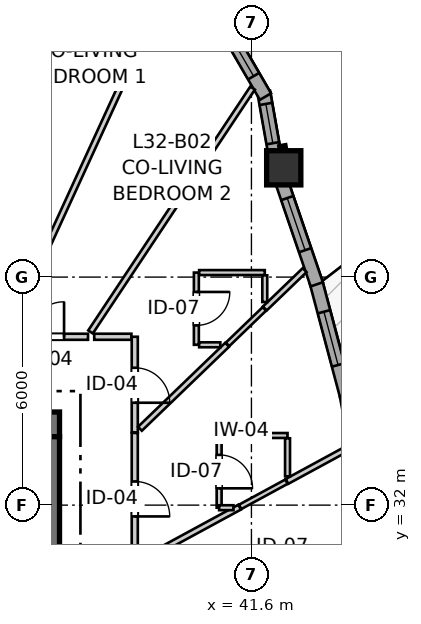
"""IFC4 building model, lengths in metres.
Left out: names, types, materials, properties, quantities, classifications, styles, units other than length and angle.
Written with IfcOpenShell. Run it as: python <this file> out.ifc"""

import sys

from ifc_helpers import new_model, si_unit, direction, frame, frame_2d, origin, origin_2d, place, context, subcontext, project, spatial, rectangle, extrude, source, transform, mapped, element, fill, save


model = new_model("IFC4")
c1 = context("Model", 3, precision=1e-05, world=origin(), true_north=direction((0.0, 1.0)))
c2 = subcontext(c1, "Body", "Model", "MODEL_VIEW")
j1 = project(units=[si_unit("LENGTHUNIT", "METRE"), si_unit("PLANEANGLEUNIT", "RADIAN")], contexts=[c1])
p1 = place(None, origin())
s1 = spatial("IfcSite", under=j1, at=p1, CompositionType="ELEMENT")
p2 = place(p1, origin())
s2 = spatial("IfcBuilding", under=s1, at=p2, CompositionType="ELEMENT")
p3 = place(p2, frame((0.0, 0.0, 108.8)))
s3 = spatial("IfcBuildingStorey", under=s2, at=p3, CompositionType="ELEMENT", Elevation=108.8)
p4 = place(p3, frame((36.55, 34.125, 0.0), z_axis=(0.0, 0.0, 1.0), x_axis=(-1.0, 0.0, 0.0)))
e1 = element("IfcWall", 1, at=p4, inside=s3, PredefinedType="SHEAR", context=c2, shape_type="SweptSolid", body=[
    extrude(rectangle(XDim=12.4, YDim=0.65, at=frame_2d((6.2, 0.0))), origin(), (0.0, 0.0, 1.0), 2.935),
])
p5 = place(p3, frame((36.225, 18.2, 0.0), z_axis=(0.0, 0.0, 1.0), x_axis=(0.0, 1.0, 0.0)))
e2 = element("IfcWall", 2, at=p5, inside=s3, PredefinedType="SHEAR", context=c2, shape_type="SweptSolid", body=[
    extrude(rectangle(XDim=15.6, YDim=0.65, at=frame_2d((7.8, 0.0))), origin(), (0.0, 0.0, 1.0), 2.935),
])
p6 = place(p5, frame((4.25, 0.0, 0.0)))
e3 = element("IfcOpeningElement", 3, at=p6, cuts=e2, PredefinedType="OPENING", context=c2, shape_type="SweptSolid", body=[
    extrude(rectangle(XDim=1.1, YDim=2.15, at=frame_2d((0.55, 1.075))), frame((0.0, 0.335, 0.0), z_axis=(0.0, -1.0, 0.0), x_axis=(1.0, 0.0, 0.0)), (0.0, 0.0, 1.0), 0.67),
])
p7 = place(p5, frame((10.25, 0.0, 0.0)))
e4 = element("IfcOpeningElement", 4, at=p7, cuts=e2, PredefinedType="OPENING", context=c2, shape_type="SweptSolid", body=[
    extrude(rectangle(XDim=1.1, YDim=2.15, at=frame_2d((0.55, 1.075))), frame((0.0, 0.335, 0.0), z_axis=(0.0, -1.0, 0.0), x_axis=(1.0, 0.0, 0.0)), (0.0, 0.0, 1.0), 0.67),
])
m1 = source(origin(), c2, "Body", "SweptSolid", [
    extrude(rectangle(XDim=0.9, YDim=0.9, at=origin_2d()), origin(), (0.0, 0.0, 1.0), 2.935),
])
p8 = place(p3, frame((42.45, 40.875, 0.0), z_axis=(0.0, 0.0, 1.0), x_axis=(1.0, 0.0, 0.0)))
e5 = element("IfcColumn", 5, at=p8, inside=s3, PredefinedType="COLUMN", context=c2, shape_type="MappedRepresentation", body=[
    mapped(m1, transform((0.0, 0.0, 0.0), x_axis=(1.0, 0.0, 0.0), y_axis=(0.0, 1.0, 0.0), z_axis=(0.0, 0.0, 1.0), scale=1.0)),
])
p9 = place(p3, frame((44.664, 31.881, 0.0), z_axis=(0.0, 0.0, 1.0), x_axis=(-0.18665909876, 0.982424745642, 0.0)))
e6 = element("IfcWall", 6, at=p9, inside=s3, PredefinedType="SOLIDWALL", context=c2, shape_type="SweptSolid", body=[
    extrude(rectangle(XDim=3.046, YDim=0.34, at=frame_2d((1.523, 0.0))), origin(), (0.0, 0.0, 1.0), 2.465),
])
p10 = place(p9, frame((0.416, 0.0, 0.82)))
e7 = element("IfcOpeningElement", 7, at=p10, cuts=e6, PredefinedType="OPENING", context=c2, shape_type="SweptSolid", body=[
    extrude(rectangle(XDim=0.95, YDim=1.35, at=frame_2d((0.475, 0.675))), frame((0.0, 0.18, 0.0), z_axis=(0.0, -1.0, 0.0), x_axis=(1.0, 0.0, 0.0)), (0.0, 0.0, 1.0), 0.36),
])
p11 = place(p9, frame((2.054, 0.0, 0.82)))
e8 = element("IfcOpeningElement", 8, at=p11, cuts=e6, PredefinedType="OPENING", context=c2, shape_type="SweptSolid", body=[
    extrude(rectangle(XDim=0.58, YDim=1.35, at=frame_2d((0.29, 0.675))), frame((0.0, 0.18, 0.0), z_axis=(0.0, -1.0, 0.0), x_axis=(1.0, 0.0, 0.0)), (0.0, 0.0, 1.0), 0.36),
])
p12 = place(p3, frame((44.09, 34.901, 0.0), z_axis=(0.0, 0.0, 1.0), x_axis=(-0.257108087637, 0.966382652613, 0.0)))
e9 = element("IfcWall", 9, at=p12, inside=s3, PredefinedType="SOLIDWALL", context=c2, shape_type="SweptSolid", body=[
    extrude(rectangle(XDim=3.096, YDim=0.34, at=frame_2d((1.548, 0.0))), origin(), (0.0, 0.0, 1.0), 2.465),
])
p13 = place(p12, frame((0.813, 0.0, 0.82)))
e10 = element("IfcOpeningElement", 10, at=p13, cuts=e9, PredefinedType="OPENING", context=c2, shape_type="SweptSolid", body=[
    extrude(rectangle(XDim=1.45, YDim=1.25, at=frame_2d((0.725, 0.625))), frame((0.0, 0.18, 0.0), z_axis=(0.0, -1.0, 0.0), x_axis=(1.0, 0.0, 0.0)), (0.0, 0.0, 1.0), 0.36),
])
p14 = place(p3, frame((43.319, 37.809, 0.0), z_axis=(0.0, 0.0, 1.0), x_axis=(-0.323586371726, 0.946198636669, 0.0)))
e11 = element("IfcWall", 11, at=p14, inside=s3, PredefinedType="SOLIDWALL", context=c2, shape_type="SweptSolid", body=[
    extrude(rectangle(XDim=2.952, YDim=0.34, at=frame_2d((1.476, 0.0))), origin(), (0.0, 0.0, 1.0), 2.465),
])
p15 = place(p14, frame((0.949, 0.0, 0.82)))
e12 = element("IfcOpeningElement", 12, at=p15, cuts=e11, PredefinedType="OPENING", context=c2, shape_type="SweptSolid", body=[
    extrude(rectangle(XDim=1.45, YDim=1.25, at=frame_2d((0.725, 0.625))), frame((0.0, 0.18, 0.0), z_axis=(0.0, -1.0, 0.0), x_axis=(1.0, 0.0, 0.0)), (0.0, 0.0, 1.0), 0.36),
])
p16 = place(p3, frame((42.242, 41.072, 0.0), z_axis=(0.0, 0.0, 1.0), x_axis=(-0.17440141227, 0.984674640375, 0.0)))
e13 = element("IfcWall", 13, at=p16, inside=s3, PredefinedType="SOLIDWALL", context=c2, shape_type="SweptSolid", body=[
    extrude(rectangle(XDim=1.831, YDim=0.34, at=frame_2d((0.916, 0.0))), origin(), (0.0, 0.0, 1.0), 2.465),
])
p17 = place(p16, frame((0.457, 0.0, 0.82)))
e14 = element("IfcOpeningElement", 14, at=p17, cuts=e13, PredefinedType="OPENING", context=c2, shape_type="SweptSolid", body=[
    extrude(rectangle(XDim=1.05, YDim=1.45, at=frame_2d((0.525, 0.725))), frame((0.0, 0.18, 0.0), z_axis=(0.0, -1.0, 0.0), x_axis=(1.0, 0.0, 0.0)), (0.0, 0.0, 1.0), 0.36),
])
p18 = place(p3, frame((41.969, 42.749, 0.0), z_axis=(0.0, 0.0, 1.0), x_axis=(-0.501989603552, 0.864873654313, 0.0)))
e15 = element("IfcWall", 15, at=p18, inside=s3, PredefinedType="SOLIDWALL", context=c2, shape_type="SweptSolid", body=[
    extrude(rectangle(XDim=2.099, YDim=0.34, at=frame_2d((1.05, 0.0))), origin(), (0.0, 0.0, 1.0), 2.465),
])
p19 = place(p18, frame((0.622, 0.0, 0.82)))
e16 = element("IfcOpeningElement", 16, at=p19, cuts=e15, PredefinedType="OPENING", context=c2, shape_type="SweptSolid", body=[
    extrude(rectangle(XDim=1.15, YDim=1.2, at=frame_2d((0.575, 0.6))), frame((0.0, 0.18, 0.0), z_axis=(0.0, -1.0, 0.0), x_axis=(1.0, 0.0, 0.0)), (0.0, 0.0, 1.0), 0.36),
])
p20 = place(p3, frame((38.53, 33.899, 0.0), z_axis=(0.0, 0.0, 1.0), x_axis=(0.0, -1.0, 0.0)))
e17 = element("IfcWall", 17, at=p20, inside=s3, PredefinedType="PARTITIONING", context=c2, shape_type="SweptSolid", body=[
    extrude(rectangle(XDim=3.469, YDim=0.16, at=frame_2d((1.734, 0.0))), origin(), (0.0, 0.0, 1.0), 2.935),
])
p21 = place(p20, frame((1.277, 0.0, 0.0)))
e18 = element("IfcOpeningElement", 18, at=p21, cuts=e17, PredefinedType="OPENING", context=c2, shape_type="SweptSolid", body=[
    extrude(rectangle(XDim=0.92, YDim=2.1, at=frame_2d((0.46, 1.05))), frame((0.0, 0.09, 0.0), z_axis=(0.0, -1.0, 0.0), x_axis=(1.0, 0.0, 0.0)), (0.0, 0.0, 1.0), 0.18),
])
p22 = place(p3, frame((38.53, 36.43, 0.0), z_axis=(0.0, 0.0, 1.0), x_axis=(0.0, -1.0, 0.0)))
e19 = element("IfcWall", 19, at=p22, inside=s3, PredefinedType="PARTITIONING", context=c2, shape_type="SweptSolid", body=[
    extrude(rectangle(XDim=2.516, YDim=0.16, at=frame_2d((1.258, 0.0))), origin(), (0.0, 0.0, 1.0), 2.573),
])
p23 = place(p22, frame((0.816, 0.0, 0.0)))
e20 = element("IfcOpeningElement", 20, at=p23, cuts=e19, PredefinedType="OPENING", context=c2, shape_type="SweptSolid", body=[
    extrude(rectangle(XDim=0.92, YDim=2.1, at=frame_2d((0.46, 1.05))), frame((0.0, 0.09, 0.0), z_axis=(0.0, -1.0, 0.0), x_axis=(1.0, 0.0, 0.0)), (0.0, 0.0, 1.0), 0.18),
])
p24 = place(p3, frame((35.121, 36.43, 0.0), z_axis=(0.0, 0.0, 1.0), x_axis=(1.0, 0.0, 0.0)))
e21 = element("IfcWall", 21, at=p24, inside=s3, PredefinedType="PARTITIONING", context=c2, shape_type="SweptSolid", body=[
    extrude(rectangle(XDim=2.179, YDim=0.16, at=frame_2d((1.089, 0.0))), origin(), (0.0, 0.0, 1.0), 2.573),
])
p25 = place(p24, frame((0.628, 0.0, 0.0)))
e22 = element("IfcOpeningElement", 22, at=p25, cuts=e21, PredefinedType="OPENING", context=c2, shape_type="SweptSolid", body=[
    extrude(rectangle(XDim=0.92, YDim=2.1, at=frame_2d((0.46, 1.05))), frame((0.0, 0.09, 0.0), z_axis=(0.0, -1.0, 0.0), x_axis=(1.0, 0.0, 0.0)), (0.0, 0.0, 1.0), 0.18),
])
p26 = place(p3, frame((40.75, 33.832, 0.0), z_axis=(0.0, 0.0, 1.0), x_axis=(0.0, -1.0, 0.0)))
e23 = element("IfcWall", 23, at=p26, inside=s3, PredefinedType="PARTITIONING", context=c2, shape_type="SweptSolid", body=[
    extrude(rectangle(XDim=1.9, YDim=0.13, at=frame_2d((0.95, 0.0))), origin(), (0.0, 0.0, 1.0), 2.935),
])
p27 = place(p26, frame((0.51, 0.0, 0.0)))
e24 = element("IfcOpeningElement", 24, at=p27, cuts=e23, PredefinedType="OPENING", context=c2, shape_type="SweptSolid", body=[
    extrude(rectangle(XDim=0.88, YDim=2.05, at=frame_2d((0.44, 1.025))), frame((0.0, 0.075, 0.0), z_axis=(0.0, -1.0, 0.0), x_axis=(1.0, 0.0, 0.0)), (0.0, 0.0, 1.0), 0.15),
])
p28 = place(p3, frame((40.151, 38.119, 0.0), z_axis=(0.0, 0.0, 1.0), x_axis=(0.0, -1.0, 0.0)))
e25 = element("IfcWall", 25, at=p28, inside=s3, PredefinedType="PARTITIONING", context=c2, shape_type="SweptSolid", body=[
    extrude(rectangle(XDim=1.9, YDim=0.13, at=frame_2d((0.95, 0.0))), origin(), (0.0, 0.0, 1.0), 2.935),
])
p29 = place(p28, frame((0.51, 0.0, 0.0)))
e26 = element("IfcOpeningElement", 26, at=p29, cuts=e25, PredefinedType="OPENING", context=c2, shape_type="SweptSolid", body=[
    extrude(rectangle(XDim=0.88, YDim=2.05, at=frame_2d((0.44, 1.025))), frame((0.0, 0.075, 0.0), z_axis=(0.0, -1.0, 0.0), x_axis=(1.0, 0.0, 0.0)), (0.0, 0.0, 1.0), 0.15),
])
p30 = place(p3, frame((35.191, 36.548, 0.0), z_axis=(0.0, 0.0, 1.0), x_axis=(0.417154036681, 0.908835799075, 0.0)))
e27 = element("IfcWall", 27, at=p30, inside=s3, PredefinedType="PARTITIONING", context=c2, shape_type="SweptSolid", body=[
    extrude(rectangle(XDim=9.949, YDim=0.145, at=frame_2d((4.974, 0.0))), origin(), (0.0, 0.0, 1.0), 2.935),
])
p31 = place(p3, frame((37.366, 36.557, 0.0), z_axis=(0.0, 0.0, 1.0), x_axis=(0.553463679146, 0.832873313215, 0.0)))
e28 = element("IfcWall", 28, at=p31, inside=s3, PredefinedType="PARTITIONING", context=c2, shape_type="SweptSolid", body=[
    extrude(rectangle(XDim=7.704, YDim=0.145, at=frame_2d((3.852, 0.0))), origin(), (0.0, 0.0, 1.0), 2.935),
])
p32 = place(p3, frame((38.666, 34.009, 0.0), z_axis=(0.0, 0.0, 1.0), x_axis=(0.72031454127, 0.693647577402, 0.0)))
e29 = element("IfcWall", 29, at=p32, inside=s3, PredefinedType="PARTITIONING", context=c2, shape_type="SweptSolid", body=[
    extrude(rectangle(XDim=3.186, YDim=0.145, at=frame_2d((1.593, 0.0))), origin(), (0.0, 0.0, 1.0), 2.935),
])
p33 = place(p3, frame((38.652, 30.513, 0.0), z_axis=(0.0, 0.0, 1.0), x_axis=(0.878637115469, 0.47749012484, 0.0)))
e30 = element("IfcWall", 30, at=p33, inside=s3, PredefinedType="PARTITIONING", context=c2, shape_type="SweptSolid", body=[
    extrude(rectangle(XDim=3.003, YDim=0.145, at=frame_2d((1.501, 0.0))), origin(), (0.0, 0.0, 1.0), 2.935),
])
p34 = place(p3, frame((42.535, 32.624, 0.0), z_axis=(0.0, 0.0, 1.0), x_axis=(0.878631690287, 0.477500107669, 0.0)))
e31 = element("IfcWall", 31, at=p34, inside=s3, PredefinedType="PARTITIONING", context=c2, shape_type="SweptSolid", body=[
    extrude(rectangle(XDim=1.861, YDim=0.145, at=frame_2d((0.93, 0.0))), origin(), (0.0, 0.0, 1.0), 2.935),
])
p35 = place(p3, frame((40.224, 38.119, 0.0), z_axis=(0.0, 0.0, 1.0), x_axis=(1.0, 0.0, 0.0)))
e32 = element("IfcWall", 32, at=p35, inside=s3, PredefinedType="PARTITIONING", context=c2, shape_type="SweptSolid", body=[
    extrude(rectangle(XDim=1.727, YDim=0.13, at=frame_2d((0.863, 0.0))), origin(), (0.0, 0.0, 1.0), 2.935),
])
p36 = place(p3, frame((40.823, 33.832, 0.0), z_axis=(0.0, 0.0, 1.0), x_axis=(1.0, 0.0, 0.0)))
e33 = element("IfcWall", 33, at=p36, inside=s3, PredefinedType="PARTITIONING", context=c2, shape_type="SweptSolid", body=[
    extrude(rectangle(XDim=1.727, YDim=0.13, at=frame_2d((0.864, 0.0))), origin(), (0.0, 0.0, 1.0), 2.935),
])
p37 = place(p3, frame((41.951, 37.173, 0.0), z_axis=(0.0, 0.0, 1.0), x_axis=(0.720559112487, 0.693393514111, 0.0)))
e34 = element("IfcWall", 34, at=p37, inside=s3, PredefinedType="PARTITIONING", context=c2, shape_type="SweptSolid", body=[
    extrude(rectangle(XDim=1.456, YDim=0.145, at=frame_2d((0.728, 0.0))), origin(), (0.0, 0.0, 1.0), 2.935),
])
p38 = place(p3, frame((41.303, 31.954, 0.0), z_axis=(0.0, 0.0, 1.0), x_axis=(0.87855387187, 0.477643270885, 0.0)))
e35 = element("IfcWall", 35, at=p38, inside=s3, PredefinedType="PARTITIONING", context=c2, shape_type="SweptSolid", body=[
    extrude(rectangle(XDim=1.387, YDim=0.13, at=frame_2d((0.694, 0.0))), origin(), (0.0, 0.0, 1.0), 2.935),
])
p39 = place(p3, frame((40.972, 36.229, 0.0), z_axis=(0.0, 0.0, 1.0), x_axis=(0.72014550452, 0.693823069896, 0.0)))
e36 = element("IfcWall", 36, at=p39, inside=s3, PredefinedType="PARTITIONING", context=c2, shape_type="SweptSolid", body=[
    extrude(rectangle(XDim=1.345, YDim=0.13, at=frame_2d((0.672, 0.0))), origin(), (0.0, 0.0, 1.0), 2.935),
])
p40 = place(p3, frame((37.463, 36.43, 0.0), z_axis=(0.0, 0.0, 1.0), x_axis=(1.0, 0.0, 0.0)))
e37 = element("IfcWall", 37, at=p40, inside=s3, PredefinedType="PARTITIONING", context=c2, shape_type="SweptSolid", body=[
    extrude(rectangle(XDim=0.979, YDim=0.16, at=frame_2d((0.489, 0.0))), origin(), (0.0, 0.0, 1.0), 2.573),
])
p41 = place(p3, frame((42.55, 32.758, 0.0), z_axis=(0.0, 0.0, 1.0), x_axis=(0.0, 1.0, 0.0)))
e38 = element("IfcWall", 38, at=p41, inside=s3, PredefinedType="PARTITIONING", context=c2, shape_type="SweptSolid", body=[
    extrude(rectangle(XDim=1.001, YDim=0.13, at=frame_2d((0.5, 0.0))), origin(), (0.0, 0.0, 1.0), 2.935),
])
p42 = place(p3, frame((41.951, 37.344, 0.0), z_axis=(0.0, 0.0, 1.0), x_axis=(0.0, 1.0, 0.0)))
e39 = element("IfcWall", 39, at=p42, inside=s3, PredefinedType="PARTITIONING", context=c2, shape_type="SweptSolid", body=[
    extrude(rectangle(XDim=0.702, YDim=0.13, at=frame_2d((0.351, 0.0))), origin(), (0.0, 0.0, 1.0), 2.935),
])
p43 = place(p3, frame((40.224, 36.219, 0.0), z_axis=(0.0, 0.0, 1.0), x_axis=(1.0, 0.0, 0.0)))
e40 = element("IfcWall", 40, at=p43, inside=s3, PredefinedType="PARTITIONING", context=c2, shape_type="SweptSolid", body=[
    extrude(rectangle(XDim=0.557, YDim=0.13, at=frame_2d((0.278, 0.0))), origin(), (0.0, 0.0, 1.0), 2.935),
])
p44 = place(p3, frame((40.75, 31.932, 0.0), z_axis=(0.0, 0.0, 1.0), x_axis=(1.0, 0.0, 0.0)))
e41 = element("IfcWall", 41, at=p44, inside=s3, PredefinedType="PARTITIONING", context=c2, shape_type="SweptSolid", body=[
    extrude(rectangle(XDim=0.377, YDim=0.13, at=frame_2d((0.188, 0.0))), origin(), (0.0, 0.0, 1.0), 2.935),
])
m2 = source(origin(), c2, "Body", "SweptSolid", [
    extrude(rectangle(XDim=1.45, YDim=1.25, at=frame_2d((0.725, 0.625))), frame((0.0, 0.03, 0.0), z_axis=(0.0, -1.0, 0.0), x_axis=(1.0, 0.0, 0.0)), (0.0, 0.0, 1.0), 0.06),
])
p45 = place(p13, origin())
e42 = element("IfcWindow", 42, at=p45, inside=s3, PartitioningType="SINGLE_PANEL", PredefinedType="WINDOW", context=c2, shape_type="MappedRepresentation", body=[
    mapped(m2, transform((0.0, 0.0, 0.0), x_axis=(1.0, 0.0, 0.0), y_axis=(0.0, 1.0, 0.0), z_axis=(0.0, 0.0, 1.0), scale=1.0)),
])
fill(e10, e42)
p46 = place(p15, origin())
e43 = element("IfcWindow", 43, at=p46, inside=s3, PartitioningType="SINGLE_PANEL", PredefinedType="WINDOW", context=c2, shape_type="MappedRepresentation", body=[
    mapped(m2, transform((0.0, 0.0, 0.0), x_axis=(1.0, 0.0, 0.0), y_axis=(0.0, 1.0, 0.0), z_axis=(0.0, 0.0, 1.0), scale=1.0)),
])
fill(e12, e43)
m3 = source(origin(), c2, "Body", "SweptSolid", [
    extrude(rectangle(XDim=1.05, YDim=1.45, at=frame_2d((0.525, 0.725))), frame((0.0, 0.03, 0.0), z_axis=(0.0, -1.0, 0.0), x_axis=(1.0, 0.0, 0.0)), (0.0, 0.0, 1.0), 0.06),
])
p47 = place(p17, origin())
e44 = element("IfcWindow", 44, at=p47, inside=s3, PartitioningType="SINGLE_PANEL", PredefinedType="WINDOW", context=c2, shape_type="MappedRepresentation", body=[
    mapped(m3, transform((0.0, 0.0, 0.0), x_axis=(1.0, 0.0, 0.0), y_axis=(0.0, 1.0, 0.0), z_axis=(0.0, 0.0, 1.0), scale=1.0)),
])
fill(e14, e44)
m4 = source(origin(), c2, "Body", "SweptSolid", [
    extrude(rectangle(XDim=1.15, YDim=1.2, at=frame_2d((0.575, 0.6))), frame((0.0, 0.03, 0.0), z_axis=(0.0, -1.0, 0.0), x_axis=(1.0, 0.0, 0.0)), (0.0, 0.0, 1.0), 0.06),
])
p48 = place(p19, origin())
e45 = element("IfcWindow", 45, at=p48, inside=s3, PartitioningType="SINGLE_PANEL", PredefinedType="WINDOW", context=c2, shape_type="MappedRepresentation", body=[
    mapped(m4, transform((0.0, 0.0, 0.0), x_axis=(1.0, 0.0, 0.0), y_axis=(0.0, 1.0, 0.0), z_axis=(0.0, 0.0, 1.0), scale=1.0)),
])
fill(e16, e45)
m5 = source(origin(), c2, "Body", "SweptSolid", [
    extrude(rectangle(XDim=0.92, YDim=2.1, at=frame_2d((0.46, 1.05))), frame((0.0, 0.025, 0.0), z_axis=(0.0, -1.0, 0.0), x_axis=(1.0, 0.0, 0.0)), (0.0, 0.0, 1.0), 0.05),
])
p49 = place(p21, origin())
e46 = element("IfcDoor", 46, at=p49, inside=s3, OperationType="SINGLE_SWING_RIGHT", PredefinedType="DOOR", context=c2, shape_type="MappedRepresentation", body=[
    mapped(m5, transform((0.0, 0.0, 0.0), x_axis=(1.0, 0.0, 0.0), y_axis=(0.0, 1.0, 0.0), z_axis=(0.0, 0.0, 1.0), scale=1.0)),
])
fill(e18, e46)
p50 = place(p23, origin())
e47 = element("IfcDoor", 47, at=p50, inside=s3, OperationType="SINGLE_SWING_RIGHT", PredefinedType="DOOR", context=c2, shape_type="MappedRepresentation", body=[
    mapped(m5, transform((0.0, 0.0, 0.0), x_axis=(1.0, 0.0, 0.0), y_axis=(0.0, 1.0, 0.0), z_axis=(0.0, 0.0, 1.0), scale=1.0)),
])
fill(e20, e47)
p51 = place(p25, origin())
e48 = element("IfcDoor", 48, at=p51, inside=s3, OperationType="SINGLE_SWING_RIGHT", PredefinedType="DOOR", context=c2, shape_type="MappedRepresentation", body=[
    mapped(m5, transform((0.0, 0.0, 0.0), x_axis=(1.0, 0.0, 0.0), y_axis=(0.0, 1.0, 0.0), z_axis=(0.0, 0.0, 1.0), scale=1.0)),
])
fill(e22, e48)
m6 = source(origin(), c2, "Body", "SweptSolid", [
    extrude(rectangle(XDim=0.88, YDim=2.05, at=frame_2d((0.44, 1.025))), frame((0.0, 0.025, 0.0), z_axis=(0.0, -1.0, 0.0), x_axis=(1.0, 0.0, 0.0)), (0.0, 0.0, 1.0), 0.05),
])
p52 = place(p27, origin())
e49 = element("IfcDoor", 49, at=p52, inside=s3, OperationType="SINGLE_SWING_RIGHT", PredefinedType="DOOR", context=c2, shape_type="MappedRepresentation", body=[
    mapped(m6, transform((0.0, 0.0, 0.0), x_axis=(1.0, 0.0, 0.0), y_axis=(0.0, 1.0, 0.0), z_axis=(0.0, 0.0, 1.0), scale=1.0)),
])
fill(e24, e49)
p53 = place(p29, origin())
e50 = element("IfcDoor", 50, at=p53, inside=s3, OperationType="SINGLE_SWING_LEFT", PredefinedType="DOOR", context=c2, shape_type="MappedRepresentation", body=[
    mapped(m6, transform((0.0, 0.0, 0.0), x_axis=(1.0, 0.0, 0.0), y_axis=(0.0, 1.0, 0.0), z_axis=(0.0, 0.0, 1.0), scale=1.0)),
])
fill(e26, e50)
save(model, sys.argv[1])
